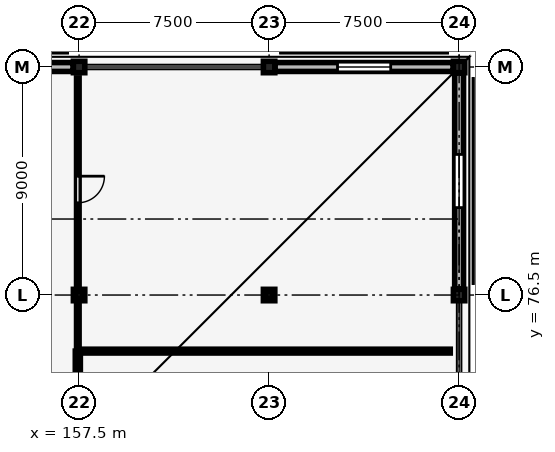
"""IFC4 building model, lengths in metres.
Left out: names, types, materials, properties, quantities, classifications, styles, units other than length and angle.
Written with IfcOpenShell. Run it as: python <this file> out.ifc"""

import sys

from ifc_helpers import new_model, si_unit, direction, frame, frame_2d, origin, origin_2d, place, context, subcontext, project, spatial, rectangle, i_section, extrude, element, fill, save


model = new_model("IFC4")
c1 = context("Model", 3, precision=1e-05, world=origin(), true_north=direction((0.0, 1.0)))
c2 = subcontext(c1, "Body", "Model", "MODEL_VIEW")
j1 = project(units=[si_unit("LENGTHUNIT", "METRE"), si_unit("PLANEANGLEUNIT", "RADIAN")], contexts=[c1])
p1 = place(None, origin())
s1 = spatial("IfcSite", under=j1, at=p1, CompositionType="ELEMENT")
p2 = place(p1, origin())
s2 = spatial("IfcBuilding", under=s1, at=p2, CompositionType="ELEMENT")
p3 = place(p2, frame((0.0, 0.0, 9.3)))
s3 = spatial("IfcBuildingStorey", under=s2, at=p3, CompositionType="ELEMENT", Elevation=9.3)
for number, where, z_axis, x_axis in (
    (1, (157.5, 76.5, 0.0), (0.0, 0.0, 1.0), (1.0, 0.0, 0.0)),
    (2, (157.5, 85.5, 0.0), (0.0, 0.0, 1.0), (1.0, 0.0, 0.0)),
    (3, (165.0, 76.5, 0.0), (0.0, 0.0, 1.0), (1.0, 0.0, 0.0)),
    (4, (165.0, 85.5, 0.0), (0.0, 0.0, 1.0), (1.0, 0.0, 0.0)),
    (5, (172.5, 76.5, 0.0), (0.0, 0.0, 1.0), (1.0, 0.0, 0.0)),
    (6, (172.5, 85.5, 0.0), (0.0, 0.0, 1.0), (1.0, 0.0, 0.0)),
):
    element("IfcColumn", number, at=place(p3, frame(where, z_axis=z_axis, x_axis=x_axis)), inside=s3, PredefinedType="COLUMN", context=c2, shape_type="SweptSolid", body=[
        extrude(rectangle(XDim=0.45, YDim=0.45, at=origin_2d()), origin(), (0.0, 0.0, 1.0), 4.8),
    ])
p4 = place(p3, frame((157.5, 76.5, 4.8), z_axis=(0.0, 0.0, 1.0), x_axis=(1.0, 0.0, 0.0)))
e7 = element("IfcColumn", 7, at=p4, inside=s3, PredefinedType="COLUMN", context=c2, shape_type="SweptSolid", body=[
    extrude(i_section(OverallWidth=0.3, OverallDepth=0.3, WebThickness=0.011, FlangeThickness=0.019, FilletRadius=0.027, at=origin_2d()), origin(), (0.0, 0.0, 1.0), 2.338),
])
p5 = place(p3, frame((165.0, 76.5, 4.8), z_axis=(0.0, 0.0, 1.0), x_axis=(1.0, 0.0, 0.0)))
e8 = element("IfcColumn", 8, at=p5, inside=s3, PredefinedType="COLUMN", context=c2, shape_type="SweptSolid", body=[
    extrude(i_section(OverallWidth=0.3, OverallDepth=0.3, WebThickness=0.011, FlangeThickness=0.019, FilletRadius=0.027, at=origin_2d()), origin(), (0.0, 0.0, 1.0), 1.97),
])
p6 = place(p3, frame((150.235, 85.5, 0.0), z_axis=(0.0, 0.0, 1.0), x_axis=(1.0, 0.0, 0.0)))
e9 = element("IfcWall", 9, at=p6, inside=s3, PredefinedType="STANDARD", context=c2, shape_type="SweptSolid", body=[
    extrude(rectangle(XDim=7.03, YDim=0.35, at=frame_2d((3.515, 0.0))), origin(), (0.0, 0.0, 1.0), 4.55),
])
p7 = place(p6, frame((2.765, 0.0, 0.9)))
e10 = element("IfcOpeningElement", 10, at=p7, cuts=e9, PredefinedType="OPENING", context=c2, shape_type="SweptSolid", body=[
    extrude(rectangle(XDim=1.5, YDim=2.1, at=frame_2d((0.75, 1.05))), frame((0.0, 0.185, 0.0), z_axis=(0.0, -1.0, 0.0), x_axis=(1.0, 0.0, 0.0)), (0.0, 0.0, 1.0), 0.37),
])
p8 = place(p3, frame((165.235, 85.5, 0.0), z_axis=(0.0, 0.0, 1.0), x_axis=(1.0, 0.0, 0.0)))
e11 = element("IfcWall", 11, at=p8, inside=s3, PredefinedType="STANDARD", context=c2, shape_type="SweptSolid", body=[
    extrude(rectangle(XDim=7.03, YDim=0.35, at=frame_2d((3.515, 0.0))), origin(), (0.0, 0.0, 1.0), 4.55),
])
p9 = place(p8, frame((2.465, 0.0, 0.9)))
e12 = element("IfcOpeningElement", 12, at=p9, cuts=e11, PredefinedType="OPENING", context=c2, shape_type="SweptSolid", body=[
    extrude(rectangle(XDim=2.1, YDim=2.1, at=frame_2d((1.05, 1.05))), frame((0.0, 0.185, 0.0), z_axis=(0.0, -1.0, 0.0), x_axis=(1.0, 0.0, 0.0)), (0.0, 0.0, 1.0), 0.37),
])
p10 = place(p3, frame((172.5, 85.265, 0.0), z_axis=(0.0, 0.0, 1.0), x_axis=(0.0, -1.0, 0.0)))
e13 = element("IfcWall", 13, at=p10, inside=s3, PredefinedType="STANDARD", context=c2, shape_type="SweptSolid", body=[
    extrude(rectangle(XDim=8.53, YDim=0.35, at=frame_2d((4.265, 0.0))), origin(), (0.0, 0.0, 1.0), 4.55),
])
p11 = place(p10, frame((3.215, 0.0, 0.9)))
e14 = element("IfcOpeningElement", 14, at=p11, cuts=e13, PredefinedType="OPENING", context=c2, shape_type="SweptSolid", body=[
    extrude(rectangle(XDim=2.1, YDim=2.1, at=frame_2d((1.05, 1.05))), frame((0.0, 0.185, 0.0), z_axis=(0.0, -1.0, 0.0), x_axis=(1.0, 0.0, 0.0)), (0.0, 0.0, 1.0), 0.37),
])
p12 = place(p3, frame((157.45, 74.287, 0.0), z_axis=(0.0, 0.0, 1.0), x_axis=(0.0, -1.0, 0.0)))
e15 = element("IfcWall", 15, at=p12, inside=s3, PredefinedType="STANDARD", context=c2, shape_type="SweptSolid", body=[
    extrude(rectangle(XDim=10.623, YDim=0.2, at=frame_2d((5.312, 0.0))), origin(), (0.0, 0.0, 1.0), 4.535),
])
p13 = place(p12, frame((8.416, 0.0, 0.0)))
e16 = element("IfcOpeningElement", 16, at=p13, cuts=e15, PredefinedType="OPENING", context=c2, shape_type="SweptSolid", body=[
    extrude(rectangle(XDim=1.05, YDim=2.2, at=frame_2d((0.525, 1.1))), frame((0.0, 0.11, 0.0), z_axis=(0.0, -1.0, 0.0), x_axis=(1.0, 0.0, 0.0)), (0.0, 0.0, 1.0), 0.22),
])
p14 = place(p3, frame((157.45, 85.07, 0.0), z_axis=(0.0, 0.0, 1.0), x_axis=(0.0, -1.0, 0.0)))
e17 = element("IfcWall", 17, at=p14, inside=s3, PredefinedType="PARTITIONING", context=c2, shape_type="SweptSolid", body=[
    extrude(rectangle(XDim=10.623, YDim=0.1, at=frame_2d((5.312, 0.0))), origin(), (0.0, 0.0, 1.0), 4.535),
])
p15 = place(p14, frame((3.879, 0.0, 0.0)))
e18 = element("IfcOpeningElement", 18, at=p15, cuts=e17, PredefinedType="OPENING", context=c2, shape_type="SweptSolid", body=[
    extrude(rectangle(XDim=1.05, YDim=2.2, at=frame_2d((0.525, 1.1))), frame((0.0, 0.06, 0.0), z_axis=(0.0, -1.0, 0.0), x_axis=(1.0, 0.0, 0.0)), (0.0, 0.0, 1.0), 0.12),
])
p16 = place(p3, frame((157.45, 74.287, 0.0), z_axis=(0.0, 0.0, 1.0), x_axis=(1.0, 0.0, 0.0)))
e19 = element("IfcWall", 19, at=p16, inside=s3, PredefinedType="PARTITIONING", context=c2, shape_type="SweptSolid", body=[
    extrude(rectangle(XDim=14.7, YDim=0.15, at=frame_2d((7.35, 0.0))), origin(), (0.0, 0.0, 1.0), 4.535),
])
p17 = place(p9, origin())
e20 = element("IfcWindow", 20, at=p17, inside=s3, PartitioningType="SINGLE_PANEL", PredefinedType="WINDOW", context=c2, shape_type="SweptSolid", body=[
    extrude(rectangle(XDim=2.1, YDim=2.1, at=frame_2d((1.05, 1.05))), frame((0.0, 0.03, 0.0), z_axis=(0.0, -1.0, 0.0), x_axis=(1.0, 0.0, 0.0)), (0.0, 0.0, 1.0), 0.06),
])
fill(e12, e20)
p18 = place(p11, origin())
e21 = element("IfcWindow", 21, at=p18, inside=s3, PartitioningType="SINGLE_PANEL", PredefinedType="WINDOW", context=c2, shape_type="SweptSolid", body=[
    extrude(rectangle(XDim=2.1, YDim=2.1, at=frame_2d((1.05, 1.05))), frame((0.0, 0.03, 0.0), z_axis=(0.0, -1.0, 0.0), x_axis=(1.0, 0.0, 0.0)), (0.0, 0.0, 1.0), 0.06),
])
fill(e14, e21)
p19 = place(p15, origin())
e22 = element("IfcDoor", 22, at=p19, inside=s3, OperationType="SINGLE_SWING_LEFT", PredefinedType="DOOR", context=c2, shape_type="SweptSolid", body=[
    extrude(rectangle(XDim=1.05, YDim=2.2, at=frame_2d((0.525, 1.1))), frame((0.0, 0.025, 0.0), z_axis=(0.0, -1.0, 0.0), x_axis=(1.0, 0.0, 0.0)), (0.0, 0.0, 1.0), 0.05),
])
fill(e18, e22)
save(model, sys.argv[1])
